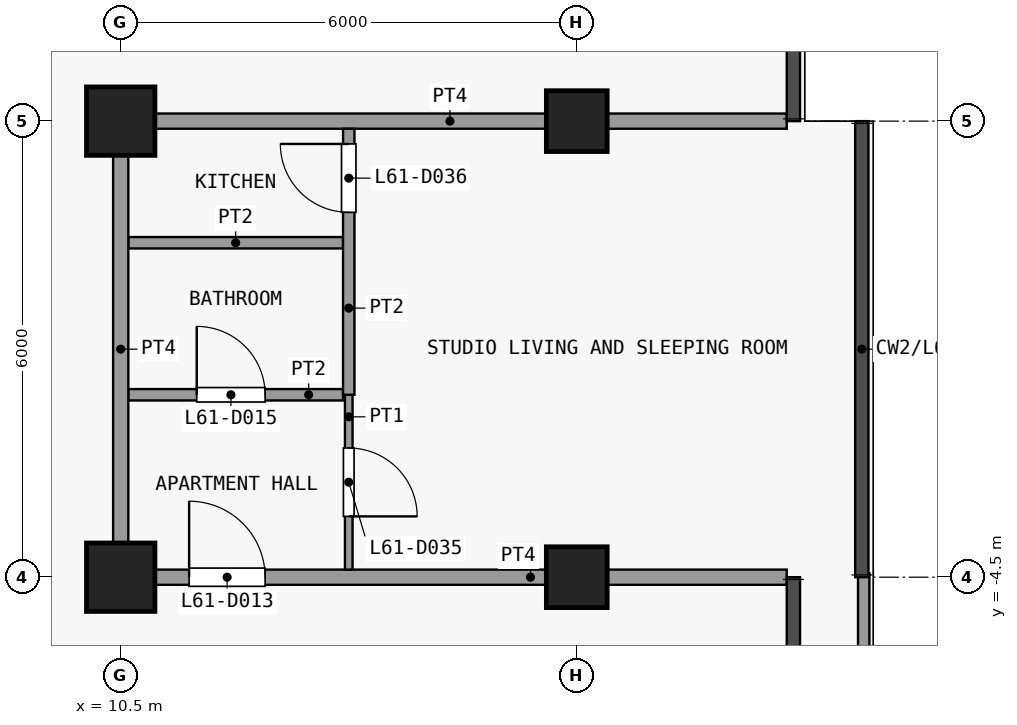
"""IFC4 building model, lengths in metres.
Left out: names, types, materials, properties, quantities, classifications, styles, units other than length and angle.
Written with IfcOpenShell. Run it as: python <this file> out.ifc"""

import sys

from ifc_helpers import new_model, si_unit, direction, frame, frame_2d, origin, origin_2d, place, context, subcontext, project, spatial, rectangle, extrude, element, fill, save


model = new_model("IFC4")
c1 = context("Model", 3, precision=1e-05, world=origin(), true_north=direction((0.0, 1.0)))
c2 = subcontext(c1, "Body", "Model", "MODEL_VIEW")
j1 = project(units=[si_unit("LENGTHUNIT", "METRE"), si_unit("PLANEANGLEUNIT", "RADIAN")], contexts=[c1])
p1 = place(None, origin())
s1 = spatial("IfcSite", under=j1, at=p1, CompositionType="ELEMENT")
p2 = place(p1, origin())
s2 = spatial("IfcBuilding", under=s1, at=p2, CompositionType="ELEMENT")
p3 = place(p2, frame((0.0, 0.0, 241.1)))
s3 = spatial("IfcBuildingStorey", under=s2, at=p3, CompositionType="ELEMENT", Elevation=241.1)
for number, where, z_axis, x_axis in (
    (1, (10.5, -4.5, 0.0), (0.0, 0.0, 1.0), (1.0, 0.0, 0.0)),
    (2, (10.5, 1.5, 0.0), (0.0, 0.0, 1.0), (1.0, 0.0, 0.0)),
):
    element("IfcColumn", number, at=place(p3, frame(where, z_axis=z_axis, x_axis=x_axis)), inside=s3, PredefinedType="COLUMN", context=c2, shape_type="SweptSolid", body=[
        extrude(rectangle(XDim=0.9, YDim=0.9, at=origin_2d()), origin(), (0.0, 0.0, 1.0), 3.6),
    ])
for number, where, z_axis, x_axis in (
    (3, (16.5, -4.5, 0.0), (0.0, 0.0, 1.0), (1.0, 0.0, 0.0)),
    (4, (16.5, 1.5, 0.0), (0.0, 0.0, 1.0), (1.0, 0.0, 0.0)),
):
    element("IfcColumn", number, at=place(p3, frame(where, z_axis=z_axis, x_axis=x_axis)), inside=s3, PredefinedType="COLUMN", context=c2, shape_type="SweptSolid", body=[
        extrude(rectangle(XDim=0.8, YDim=0.8, at=origin_2d()), origin(), (0.0, 0.0, 1.0), 3.6),
    ])
p4 = place(p3, frame((20.275, -4.448, 0.0), z_axis=(0.0, 0.0, 1.0), x_axis=(0.0, -1.0, 0.0)))
e5 = element("IfcWall", 5, at=p4, inside=s3, PredefinedType="PARAPET", context=c2, shape_type="SweptSolid", body=[
    extrude(rectangle(XDim=9.002, YDim=0.15, at=frame_2d((4.501, 0.0))), origin(), (0.0, 0.0, 1.0), 1.15),
])
p5 = place(p3, frame((10.4, -4.5, 0.0), z_axis=(0.0, 0.0, 1.0), x_axis=(1.0, 0.0, 0.0)))
e6 = element("IfcWall", 6, at=p5, inside=s3, PredefinedType="PARTITIONING", context=c2, shape_type="SweptSolid", body=[
    extrude(rectangle(XDim=8.863, YDim=0.2, at=frame_2d((4.431, 0.0))), origin(), (0.0, 0.0, 1.0), 3.3),
])
p6 = place(p5, frame((1.0, 0.0, 0.0)))
e7 = element("IfcOpeningElement", 7, at=p6, cuts=e6, PredefinedType="OPENING", context=c2, shape_type="SweptSolid", body=[
    extrude(rectangle(XDim=1.0, YDim=2.1, at=frame_2d((0.5, 1.05))), frame((0.0, 0.11, 0.0), z_axis=(0.0, -1.0, 0.0), x_axis=(1.0, 0.0, 0.0)), (0.0, 0.0, 1.0), 0.22),
])
p7 = place(p3, frame((10.6, -2.1, 0.0), z_axis=(0.0, 0.0, 1.0), x_axis=(1.0, 0.0, 0.0)))
e8 = element("IfcWall", 8, at=p7, inside=s3, PredefinedType="PARTITIONING", context=c2, shape_type="SweptSolid", body=[
    extrude(rectangle(XDim=2.825, YDim=0.15, at=frame_2d((1.413, 0.0))), origin(), (0.0, 0.0, 1.0), 3.3),
])
p8 = place(p7, frame((0.9, 0.0, 0.0)))
e9 = element("IfcOpeningElement", 9, at=p8, cuts=e8, PredefinedType="OPENING", context=c2, shape_type="SweptSolid", body=[
    extrude(rectangle(XDim=0.9, YDim=2.1, at=frame_2d((0.45, 1.05))), frame((0.0, 0.085, 0.0), z_axis=(0.0, -1.0, 0.0), x_axis=(1.0, 0.0, 0.0)), (0.0, 0.0, 1.0), 0.17),
])
p9 = place(p3, frame((10.6, -0.1, 0.0), z_axis=(0.0, 0.0, 1.0), x_axis=(1.0, 0.0, 0.0)))
e10 = element("IfcWall", 10, at=p9, inside=s3, PredefinedType="PARTITIONING", context=c2, shape_type="SweptSolid", body=[
    extrude(rectangle(XDim=2.825, YDim=0.15, at=frame_2d((1.413, 0.0))), origin(), (0.0, 0.0, 1.0), 3.3),
])
p10 = place(p3, frame((10.4, 1.5, 0.0), z_axis=(0.0, 0.0, 1.0), x_axis=(1.0, 0.0, 0.0)))
e11 = element("IfcWall", 11, at=p10, inside=s3, PredefinedType="PARTITIONING", context=c2, shape_type="SweptSolid", body=[
    extrude(rectangle(XDim=8.863, YDim=0.2, at=frame_2d((4.431, 0.0))), origin(), (0.0, 0.0, 1.0), 3.3),
])
p11 = place(p3, frame((10.5, -4.4, 0.0), z_axis=(0.0, 0.0, 1.0), x_axis=(0.0, 1.0, 0.0)))
e12 = element("IfcWall", 12, at=p11, inside=s3, PredefinedType="PARTITIONING", context=c2, shape_type="SweptSolid", body=[
    extrude(rectangle(XDim=5.8, YDim=0.2, at=frame_2d((2.9, 0.0))), origin(), (0.0, 0.0, 1.0), 3.3),
])
p12 = place(p3, frame((13.5, -4.4, 0.0), z_axis=(0.0, 0.0, 1.0), x_axis=(0.0, 1.0, 0.0)))
e13 = element("IfcWall", 13, at=p12, inside=s3, PredefinedType="PARTITIONING", context=c2, shape_type="SweptSolid", body=[
    extrude(rectangle(XDim=2.3, YDim=0.1, at=frame_2d((1.15, 0.0))), origin(), (0.0, 0.0, 1.0), 3.3),
])
p13 = place(p12, frame((0.7, 0.0, 0.0)))
e14 = element("IfcOpeningElement", 14, at=p13, cuts=e13, PredefinedType="OPENING", context=c2, shape_type="SweptSolid", body=[
    extrude(rectangle(XDim=0.9, YDim=2.1, at=frame_2d((0.45, 1.05))), frame((0.0, 0.06, 0.0), z_axis=(0.0, -1.0, 0.0), x_axis=(1.0, 0.0, 0.0)), (0.0, 0.0, 1.0), 0.12),
])
p14 = place(p3, frame((13.5, -2.1, 0.0), z_axis=(0.0, 0.0, 1.0), x_axis=(0.0, 1.0, 0.0)))
e15 = element("IfcWall", 15, at=p14, inside=s3, PredefinedType="PARTITIONING", context=c2, shape_type="SweptSolid", body=[
    extrude(rectangle(XDim=3.5, YDim=0.15, at=frame_2d((1.75, 0.0))), origin(), (0.0, 0.0, 1.0), 3.3),
])
p15 = place(p14, frame((2.4, 0.0, 0.0)))
e16 = element("IfcOpeningElement", 16, at=p15, cuts=e15, PredefinedType="OPENING", context=c2, shape_type="SweptSolid", body=[
    extrude(rectangle(XDim=0.9, YDim=2.1, at=frame_2d((0.45, 1.05))), frame((0.0, 0.085, 0.0), z_axis=(0.0, -1.0, 0.0), x_axis=(1.0, 0.0, 0.0)), (0.0, 0.0, 1.0), 0.17),
])
p16 = place(p6, origin())
e17 = element("IfcDoor", 17, at=p16, inside=s3, OperationType="SINGLE_SWING_RIGHT", PredefinedType="DOOR", context=c2, shape_type="SweptSolid", body=[
    extrude(rectangle(XDim=1.0, YDim=2.1, at=frame_2d((0.5, 1.05))), frame((0.0, 0.025, 0.0), z_axis=(0.0, -1.0, 0.0), x_axis=(1.0, 0.0, 0.0)), (0.0, 0.0, 1.0), 0.05),
])
fill(e7, e17)
p17 = place(p8, origin())
e18 = element("IfcDoor", 18, at=p17, inside=s3, OperationType="SINGLE_SWING_RIGHT", PredefinedType="DOOR", context=c2, shape_type="SweptSolid", body=[
    extrude(rectangle(XDim=0.9, YDim=2.1, at=frame_2d((0.45, 1.05))), frame((0.0, 0.025, 0.0), z_axis=(0.0, -1.0, 0.0), x_axis=(1.0, 0.0, 0.0)), (0.0, 0.0, 1.0), 0.05),
])
fill(e9, e18)
p18 = place(p13, origin())
e19 = element("IfcDoor", 19, at=p18, inside=s3, OperationType="SINGLE_SWING_LEFT", PredefinedType="DOOR", context=c2, shape_type="SweptSolid", body=[
    extrude(rectangle(XDim=0.9, YDim=2.1, at=frame_2d((0.45, 1.05))), frame((0.0, 0.025, 0.0), z_axis=(0.0, -1.0, 0.0), x_axis=(1.0, 0.0, 0.0)), (0.0, 0.0, 1.0), 0.05),
])
fill(e14, e19)
p19 = place(p15, origin())
e20 = element("IfcDoor", 20, at=p19, inside=s3, OperationType="SINGLE_SWING_LEFT", PredefinedType="DOOR", context=c2, shape_type="SweptSolid", body=[
    extrude(rectangle(XDim=0.9, YDim=2.1, at=frame_2d((0.45, 1.05))), frame((0.0, 0.025, 0.0), z_axis=(0.0, -1.0, 0.0), x_axis=(1.0, 0.0, 0.0)), (0.0, 0.0, 1.0), 0.05),
])
fill(e16, e20)
save(model, sys.argv[1])
